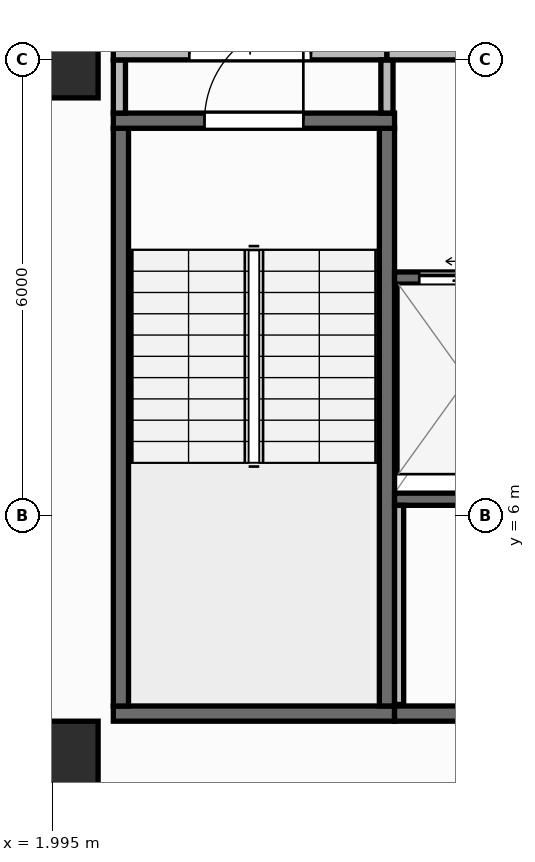
"""IFC4 building model, lengths in metres.
Left out: names, types, materials, properties, quantities, classifications, styles, units other than length and angle.
Written with IfcOpenShell. Run it as: python <this file> out.ifc"""

import sys

from ifc_helpers import new_model, si_unit, direction, frame, frame_2d, origin, origin_2d, place, context, subcontext, project, spatial, rectangle, extrude, element, fill, save


model = new_model("IFC4")
c1 = context("Model", 3, precision=1e-05, world=origin(), true_north=direction((0.0, 1.0)))
c2 = subcontext(c1, "Body", "Model", "MODEL_VIEW")
j1 = project(units=[si_unit("LENGTHUNIT", "METRE"), si_unit("PLANEANGLEUNIT", "RADIAN")], contexts=[c1])
p1 = place(None, origin())
s1 = spatial("IfcSite", under=j1, at=p1, CompositionType="ELEMENT")
p2 = place(p1, origin())
s2 = spatial("IfcBuilding", under=s1, at=p2, CompositionType="ELEMENT")
p3 = place(p2, frame((0.0, 0.0, 200.0)))
s3 = spatial("IfcBuildingStorey", under=s2, at=p3, CompositionType="ELEMENT", Elevation=200.0)
for number, where, z_axis, x_axis in (
    (1, (2.1, 2.8, 0.0), (0.0, 0.0, 1.0), (1.0, 0.0, 0.0)),
    (2, (2.1, 12.0, 0.0), (0.0, 0.0, 1.0), (1.0, 0.0, 0.0)),
):
    element("IfcColumn", number, at=place(p3, frame(where, z_axis=z_axis, x_axis=x_axis)), inside=s3, PredefinedType="COLUMN", context=c2, shape_type="SweptSolid", body=[
        extrude(rectangle(XDim=1.0, YDim=1.0, at=origin_2d()), origin(), (0.0, 0.0, 1.0), 3.95),
    ])
p4 = place(p3, frame((2.66, 0.174, 0.0), z_axis=(0.0, 0.0, 1.0), x_axis=(0.996634028439, 0.081979347142, 0.0)))
e3 = element("IfcWall", 3, at=p4, inside=s3, PredefinedType="STANDARD", context=c2, shape_type="SweptSolid", body=[
    extrude(rectangle(XDim=46.035, YDim=0.26, at=frame_2d((23.018, 0.0))), origin(), (0.0, 0.0, 1.0), 3.71),
])
p5 = place(p4, frame((21.817, 0.0, 0.9)))
e4 = element("IfcOpeningElement", 4, at=p5, cuts=e3, PredefinedType="OPENING", context=c2, shape_type="SweptSolid", body=[
    extrude(rectangle(XDim=2.4, YDim=1.65, at=frame_2d((1.2, 0.825))), frame((0.0, 0.14, 0.0), z_axis=(0.0, -1.0, 0.0), x_axis=(1.0, 0.0, 0.0)), (0.0, 0.0, 1.0), 0.28),
])
p6 = place(p3, frame((2.8, 3.4, 0.0), z_axis=(0.0, 0.0, 1.0), x_axis=(1.0, 0.0, 0.0)))
e5 = element("IfcWall", 5, at=p6, inside=s3, PredefinedType="SHEAR", context=c2, shape_type="SweptSolid", body=[
    extrude(rectangle(XDim=3.7, YDim=0.2, at=frame_2d((1.85, 0.0))), origin(), (0.0, 0.0, 1.0), 3.71),
])
for number, where, z_axis, x_axis in (
    (6, (2.9, 3.5, 0.0), (0.0, 0.0, 1.0), (0.0, 1.0, 0.0)),
    (7, (6.4, 3.5, 0.0), (0.0, 0.0, 1.0), (0.0, 1.0, 0.0)),
):
    element("IfcWall", number, at=place(p3, frame(where, z_axis=z_axis, x_axis=x_axis)), inside=s3, PredefinedType="SHEAR", context=c2, shape_type="SweptSolid", body=[
        extrude(rectangle(XDim=7.6, YDim=0.2, at=frame_2d((3.8, 0.0))), origin(), (0.0, 0.0, 1.0), 3.71),
    ])
p7 = place(p3, frame((2.8, 11.2, 0.0), z_axis=(0.0, 0.0, 1.0), x_axis=(1.0, 0.0, 0.0)))
e8 = element("IfcWall", 8, at=p7, inside=s3, PredefinedType="SHEAR", context=c2, shape_type="SweptSolid", body=[
    extrude(rectangle(XDim=3.7, YDim=0.2, at=frame_2d((1.85, 0.0))), origin(), (0.0, 0.0, 1.0), 3.71),
])
p8 = place(p7, frame((1.2, 0.0, 0.0)))
e9 = element("IfcOpeningElement", 9, at=p8, cuts=e8, PredefinedType="OPENING", context=c2, shape_type="SweptSolid", body=[
    extrude(rectangle(XDim=1.3, YDim=2.15, at=frame_2d((0.65, 1.075))), frame((0.0, 0.11, 0.0), z_axis=(0.0, -1.0, 0.0), x_axis=(1.0, 0.0, 0.0)), (0.0, 0.0, 1.0), 0.22),
])
p9 = place(p3, frame((6.5, 3.4, 0.0), z_axis=(0.0, 0.0, 1.0), x_axis=(1.0, 0.0, 0.0)))
e10 = element("IfcWall", 10, at=p9, inside=s3, PredefinedType="SHEAR", context=c2, shape_type="SweptSolid", body=[
    extrude(rectangle(XDim=13.7, YDim=0.2, at=frame_2d((6.85, 0.0))), origin(), (0.0, 0.0, 1.0), 3.71),
])
p10 = place(p3, frame((6.5, 6.22, 0.0), z_axis=(0.0, 0.0, 1.0), x_axis=(1.0, 0.0, 0.0)))
e11 = element("IfcWall", 11, at=p10, inside=s3, PredefinedType="SHEAR", context=c2, shape_type="SweptSolid", body=[
    extrude(rectangle(XDim=12.11, YDim=0.16, at=frame_2d((6.055, 0.0))), origin(), (0.0, 0.0, 1.0), 3.71),
])
p11 = place(p3, frame((6.5, 9.13, 0.0), z_axis=(0.0, 0.0, 1.0), x_axis=(1.0, 0.0, 0.0)))
e12 = element("IfcWall", 12, at=p11, inside=s3, PredefinedType="SHEAR", context=c2, shape_type="SweptSolid", body=[
    extrude(rectangle(XDim=1.975, YDim=0.16, at=frame_2d((0.988, 0.0))), origin(), (0.0, 0.0, 1.0), 3.71),
])
p12 = place(p11, frame((0.325, 0.0, 0.0)))
e13 = element("IfcOpeningElement", 13, at=p12, cuts=e12, PredefinedType="OPENING", context=c2, shape_type="SweptSolid", body=[
    extrude(rectangle(XDim=1.25, YDim=2.15, at=frame_2d((0.625, 1.075))), frame((0.0, 0.09, 0.0), z_axis=(0.0, -1.0, 0.0), x_axis=(1.0, 0.0, 0.0)), (0.0, 0.0, 1.0), 0.18),
])
p13 = place(p3, frame((6.56, 3.52, 0.0), z_axis=(0.0, 0.0, 1.0), x_axis=(0.0, 1.0, 0.0)))
e14 = element("IfcWall", 14, at=p13, inside=s3, PredefinedType="PARTITIONING", context=c2, shape_type="SweptSolid", body=[
    extrude(rectangle(XDim=2.62, YDim=0.12, at=frame_2d((1.31, 0.0))), origin(), (0.0, 0.0, 1.0), 3.71),
])
p14 = place(p3, frame((2.88, 11.3, 0.0), z_axis=(0.0, 0.0, 1.0), x_axis=(0.0, 1.0, 0.0)))
e15 = element("IfcWall", 15, at=p14, inside=s3, PredefinedType="PARTITIONING", context=c2, shape_type="SweptSolid", body=[
    extrude(rectangle(XDim=0.7, YDim=0.16, at=frame_2d((0.35, 0.0))), origin(), (0.0, 0.0, 1.0), 3.71),
])
p15 = place(p3, frame((2.8, 12.08, 0.0), z_axis=(0.0, 0.0, 1.0), x_axis=(1.0, 0.0, 0.0)))
e16 = element("IfcWall", 16, at=p15, inside=s3, PredefinedType="PARTITIONING", context=c2, shape_type="SweptSolid", body=[
    extrude(rectangle(XDim=3.6, YDim=0.16, at=frame_2d((1.8, 0.0))), origin(), (0.0, 0.0, 1.0), 3.152),
])
p16 = place(p15, frame((1.0, 0.0, 0.0)))
e17 = element("IfcOpeningElement", 17, at=p16, cuts=e16, PredefinedType="OPENING", context=c2, shape_type="SweptSolid", body=[
    extrude(rectangle(XDim=1.6, YDim=2.05, at=frame_2d((0.8, 1.025))), frame((0.0, 0.09, 0.0), z_axis=(0.0, -1.0, 0.0), x_axis=(1.0, 0.0, 0.0)), (0.0, 0.0, 1.0), 0.18),
])
p17 = place(p3, frame((6.4, 11.3, 0.0), z_axis=(0.0, 0.0, 1.0), x_axis=(0.0, 1.0, 0.0)))
e18 = element("IfcWall", 18, at=p17, inside=s3, PredefinedType="PARTITIONING", context=c2, shape_type="SweptSolid", body=[
    extrude(rectangle(XDim=0.7, YDim=0.16, at=frame_2d((0.35, 0.0))), origin(), (0.0, 0.0, 1.0), 3.71),
])
p18 = place(p3, frame((6.4, 12.08, 0.0), z_axis=(0.0, 0.0, 1.0), x_axis=(1.0, 0.0, 0.0)))
e19 = element("IfcWall", 19, at=p18, inside=s3, PredefinedType="PARTITIONING", context=c2, shape_type="SweptSolid", body=[
    extrude(rectangle(XDim=6.18, YDim=0.16, at=frame_2d((3.09, 0.0))), origin(), (0.0, 0.0, 1.0), 3.152),
])
p19 = place(p18, frame((2.29, 0.0, 0.0)))
e20 = element("IfcOpeningElement", 20, at=p19, cuts=e19, PredefinedType="OPENING", context=c2, shape_type="SweptSolid", body=[
    extrude(rectangle(XDim=1.6, YDim=2.05, at=frame_2d((0.8, 1.025))), frame((0.0, 0.09, 0.0), z_axis=(0.0, -1.0, 0.0), x_axis=(1.0, 0.0, 0.0)), (0.0, 0.0, 1.0), 0.18),
])
p20 = place(p8, origin())
e21 = element("IfcDoor", 21, at=p20, inside=s3, OperationType="SINGLE_SWING_RIGHT", PredefinedType="DOOR", context=c2, shape_type="SweptSolid", body=[
    extrude(rectangle(XDim=1.3, YDim=2.15, at=frame_2d((0.65, 1.075))), frame((0.0, 0.025, 0.0), z_axis=(0.0, -1.0, 0.0), x_axis=(1.0, 0.0, 0.0)), (0.0, 0.0, 1.0), 0.05),
])
fill(e9, e21)
p21 = place(p12, origin())
e22 = element("IfcDoor", 22, at=p21, inside=s3, OperationType="SLIDING_TO_LEFT", PredefinedType="DOOR", context=c2, shape_type="SweptSolid", body=[
    extrude(rectangle(XDim=1.25, YDim=2.15, at=frame_2d((0.625, 1.075))), frame((0.0, 0.025, 0.0), z_axis=(0.0, -1.0, 0.0), x_axis=(1.0, 0.0, 0.0)), (0.0, 0.0, 1.0), 0.05),
])
fill(e13, e22)
p22 = place(p16, origin())
e23 = element("IfcDoor", 23, at=p22, inside=s3, OperationType="DOUBLE_DOOR_SINGLE_SWING", PredefinedType="DOOR", context=c2, shape_type="SweptSolid", body=[
    extrude(rectangle(XDim=1.6, YDim=2.05, at=frame_2d((0.8, 1.025))), frame((0.0, 0.025, 0.0), z_axis=(0.0, -1.0, 0.0), x_axis=(1.0, 0.0, 0.0)), (0.0, 0.0, 1.0), 0.05),
])
fill(e17, e23)
save(model, sys.argv[1])
